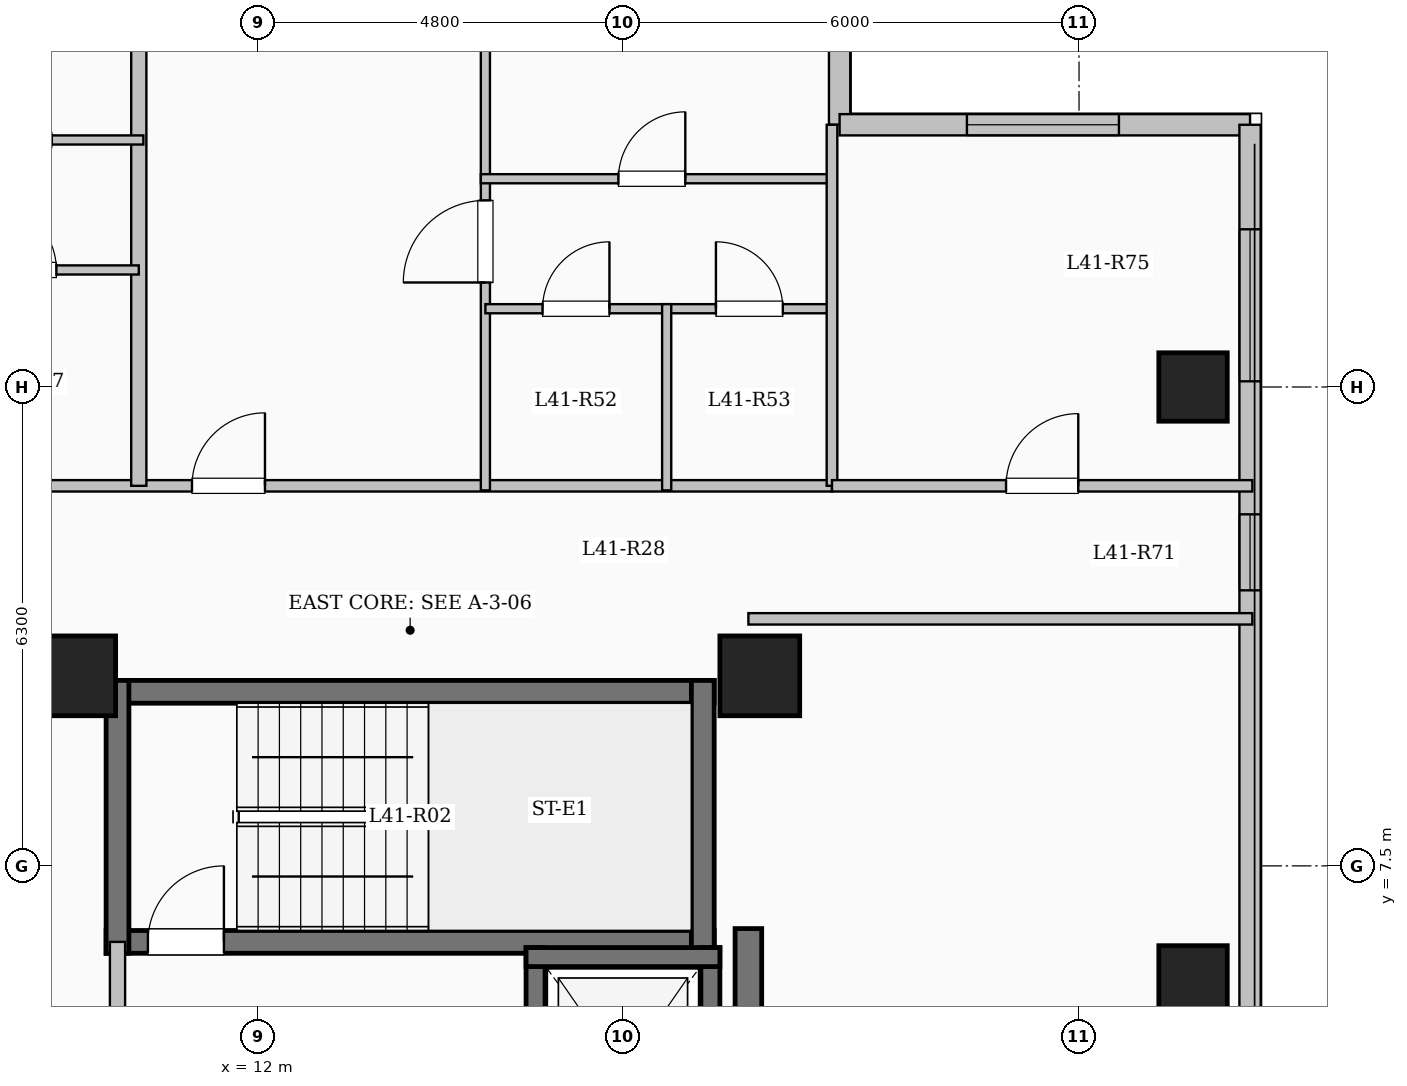
"""IFC4 building model, lengths in metres.
Left out: names, types, materials, properties, quantities, classifications, styles, units other than length and angle.
Written with IfcOpenShell. Run it as: python <this file> out.ifc"""

import sys

from ifc_helpers import new_model, si_unit, direction, frame, frame_2d, origin, origin_2d, place, context, subcontext, project, spatial, rectangle, extrude, element, fill, save


model = new_model("IFC4")
c1 = context("Model", 3, precision=1e-05, world=origin(), true_north=direction((0.0, 1.0)))
c2 = subcontext(c1, "Body", "Model", "MODEL_VIEW")
j1 = project(units=[si_unit("LENGTHUNIT", "METRE"), si_unit("PLANEANGLEUNIT", "RADIAN")], contexts=[c1])
p1 = place(None, origin())
s1 = spatial("IfcSite", under=j1, at=p1, CompositionType="ELEMENT")
p2 = place(p1, origin())
s2 = spatial("IfcBuilding", under=s1, at=p2, CompositionType="ELEMENT")
p3 = place(p2, frame((0.0, 0.0, 152.7)))
s3 = spatial("IfcBuildingStorey", under=s2, at=p3, CompositionType="ELEMENT", Elevation=152.7)
for number, where, z_axis, x_axis in (
    (1, (9.6, 10.0, 0.0), (0.0, 0.0, 1.0), (1.0, 0.0, 0.0)),
    (2, (18.6, 10.0, 0.0), (0.0, 0.0, 1.0), (1.0, 0.0, 0.0)),
):
    element("IfcColumn", number, at=place(p3, frame(where, z_axis=z_axis, x_axis=x_axis)), inside=s3, PredefinedType="COLUMN", context=c2, shape_type="SweptSolid", body=[
        extrude(rectangle(XDim=1.05, YDim=1.05, at=origin_2d()), origin(), (0.0, 0.0, 1.0), 3.35),
    ])
for number, where, z_axis, x_axis in (
    (3, (24.3, 6.0, 0.0), (0.0, 0.0, 1.0), (1.0, 0.0, 0.0)),
    (4, (24.3, 13.8, 0.0), (0.0, 0.0, 1.0), (1.0, 0.0, 0.0)),
):
    element("IfcColumn", number, at=place(p3, frame(where, z_axis=z_axis, x_axis=x_axis)), inside=s3, PredefinedType="COLUMN", context=c2, shape_type="SweptSolid", body=[
        extrude(rectangle(XDim=0.9, YDim=0.9, at=origin_2d()), origin(), (0.0, 0.0, 1.0), 3.35),
    ])
p4 = place(p3, frame((19.65, 21.15, 0.0), z_axis=(0.0, 0.0, 1.0), x_axis=(0.0, -1.0, 0.0)))
e5 = element("IfcWall", 5, at=p4, inside=s3, PredefinedType="SOLIDWALL", context=c2, shape_type="SweptSolid", body=[
    extrude(rectangle(XDim=3.9, YDim=0.28, at=frame_2d((1.95, 0.0))), origin(), (0.0, 0.0, 1.0), 3.1),
])
p5 = place(p4, frame((1.143, 0.0, 0.9)))
e6 = element("IfcOpeningElement", 6, at=p5, cuts=e5, PredefinedType="OPENING", context=c2, shape_type="SweptSolid", body=[
    extrude(rectangle(XDim=1.65, YDim=1.6, at=frame_2d((0.825, 0.8))), frame((0.0, 0.15, 0.0), z_axis=(0.0, -1.0, 0.0), x_axis=(1.0, 0.0, 0.0)), (0.0, 0.0, 1.0), 0.3),
])
p6 = place(p3, frame((19.65, 17.25, 0.0), z_axis=(0.0, 0.0, 1.0), x_axis=(1.0, 0.0, 0.0)))
e7 = element("IfcWall", 7, at=p6, inside=s3, PredefinedType="SOLIDWALL", context=c2, shape_type="SweptSolid", body=[
    extrude(rectangle(XDim=5.4, YDim=0.28, at=frame_2d((2.7, 0.0))), origin(), (0.0, 0.0, 1.0), 3.1),
])
p7 = place(p6, frame((1.675, 0.0, 0.9)))
e8 = element("IfcOpeningElement", 8, at=p7, cuts=e7, PredefinedType="OPENING", context=c2, shape_type="SweptSolid", body=[
    extrude(rectangle(XDim=2.0, YDim=1.7, at=frame_2d((1.0, 0.85))), frame((0.0, 0.15, 0.0), z_axis=(0.0, -1.0, 0.0), x_axis=(1.0, 0.0, 0.0)), (0.0, 0.0, 1.0), 0.3),
])
p8 = place(p3, frame((25.05, 17.25, 0.0), z_axis=(0.0, 0.0, 1.0), x_axis=(0.0, -1.0, 0.0)))
e9 = element("IfcWall", 9, at=p8, inside=s3, PredefinedType="SOLIDWALL", context=c2, shape_type="SweptSolid", body=[
    extrude(rectangle(XDim=34.5, YDim=0.28, at=frame_2d((17.25, 0.0))), origin(), (0.0, 0.0, 1.0), 3.1),
])
p9 = place(p8, frame((1.375, 0.0, 0.9)))
e10 = element("IfcOpeningElement", 10, at=p9, cuts=e9, PredefinedType="OPENING", context=c2, shape_type="SweptSolid", body=[
    extrude(rectangle(XDim=2.0, YDim=1.7, at=frame_2d((1.0, 0.85))), frame((0.0, 0.15, 0.0), z_axis=(0.0, -1.0, 0.0), x_axis=(1.0, 0.0, 0.0)), (0.0, 0.0, 1.0), 0.3),
])
p10 = place(p8, frame((5.125, 0.0, 0.95)))
e11 = element("IfcOpeningElement", 11, at=p10, cuts=e9, PredefinedType="OPENING", context=c2, shape_type="SweptSolid", body=[
    extrude(rectangle(XDim=1.0, YDim=1.5, at=frame_2d((0.5, 0.75))), frame((0.0, 0.15, 0.0), z_axis=(0.0, -1.0, 0.0), x_axis=(1.0, 0.0, 0.0)), (0.0, 0.0, 1.0), 0.3),
])
p11 = place(p8, frame((14.5, 0.0, 0.9)))
e12 = element("IfcOpeningElement", 12, at=p11, cuts=e9, PredefinedType="OPENING", context=c2, shape_type="SweptSolid", body=[
    extrude(rectangle(XDim=2.0, YDim=1.7, at=frame_2d((1.0, 0.85))), frame((0.0, 0.15, 0.0), z_axis=(0.0, -1.0, 0.0), x_axis=(1.0, 0.0, 0.0)), (0.0, 0.0, 1.0), 0.3),
])
p12 = place(p8, frame((25.258, 0.0, 0.9)))
e13 = element("IfcOpeningElement", 13, at=p12, cuts=e9, PredefinedType="OPENING", context=c2, shape_type="SweptSolid", body=[
    extrude(rectangle(XDim=1.5, YDim=1.65, at=frame_2d((0.75, 0.825))), frame((0.0, 0.15, 0.0), z_axis=(0.0, -1.0, 0.0), x_axis=(1.0, 0.0, 0.0)), (0.0, 0.0, 1.0), 0.3),
])
p13 = place(p8, frame((29.95, 0.0, 0.9)))
e14 = element("IfcOpeningElement", 14, at=p13, cuts=e9, PredefinedType="OPENING", context=c2, shape_type="SweptSolid", body=[
    extrude(rectangle(XDim=2.2, YDim=1.75, at=frame_2d((1.1, 0.875))), frame((0.0, 0.15, 0.0), z_axis=(0.0, -1.0, 0.0), x_axis=(1.0, 0.0, 0.0)), (0.0, 0.0, 1.0), 0.3),
])
p14 = place(p3, frame((10.0, 9.79, 0.0), z_axis=(0.0, 0.0, 1.0), x_axis=(1.0, 0.0, 0.0)))
e15 = element("IfcWall", 15, at=p14, inside=s3, PredefinedType="SHEAR", context=c2, shape_type="SweptSolid", body=[
    extrude(rectangle(XDim=8.0, YDim=0.3, at=frame_2d((4.0, 0.0))), origin(), (0.0, 0.0, 1.0), 3.35),
])
p15 = place(p3, frame((10.0, 6.5, 0.0), z_axis=(0.0, 0.0, 1.0), x_axis=(1.0, 0.0, 0.0)))
e16 = element("IfcWall", 16, at=p15, inside=s3, PredefinedType="SHEAR", context=c2, shape_type="SweptSolid", body=[
    extrude(rectangle(XDim=8.0, YDim=0.3, at=frame_2d((4.0, 0.0))), origin(), (0.0, 0.0, 1.0), 3.35),
])
p16 = place(p15, frame((0.55, 0.0, 0.0)))
e17 = element("IfcOpeningElement", 17, at=p16, cuts=e16, PredefinedType="OPENING", context=c2, shape_type="SweptSolid", body=[
    extrude(rectangle(XDim=1.0, YDim=2.15, at=frame_2d((0.5, 1.075))), frame((0.0, 0.16, 0.0), z_axis=(0.0, -1.0, 0.0), x_axis=(1.0, 0.0, 0.0)), (0.0, 0.0, 1.0), 0.32),
])
for number, where, z_axis, x_axis in (
    (18, (10.15, 6.35, 0.0), (0.0, 0.0, 1.0), (0.0, 1.0, 0.0)),
    (19, (17.85, 6.35, 0.0), (0.0, 0.0, 1.0), (0.0, 1.0, 0.0)),
):
    element("IfcWall", number, at=place(p3, frame(where, z_axis=z_axis, x_axis=x_axis)), inside=s3, PredefinedType="SHEAR", context=c2, shape_type="SweptSolid", body=[
        extrude(rectangle(XDim=3.59, YDim=0.3, at=frame_2d((1.795, 0.0))), origin(), (0.0, 0.0, 1.0), 3.35),
    ])
p17 = place(p3, frame((10.15, 3.25, 0.0), z_axis=(0.0, 0.0, 1.0), x_axis=(0.0, 1.0, 0.0)))
e20 = element("IfcWall", 20, at=p17, inside=s3, PredefinedType="SOLIDWALL", context=c2, shape_type="SweptSolid", body=[
    extrude(rectangle(XDim=3.25, YDim=0.2, at=frame_2d((1.625, 0.0))), origin(), (0.0, 0.0, 1.0), 3.1),
])
p18 = place(p17, frame((1.1, 0.0, 0.0)))
e21 = element("IfcOpeningElement", 21, at=p18, cuts=e20, PredefinedType="OPENING", context=c2, shape_type="SweptSolid", body=[
    extrude(rectangle(XDim=1.02, YDim=2.15, at=frame_2d((0.51, 1.075))), frame((0.0, 0.11, 0.0), z_axis=(0.0, -1.0, 0.0), x_axis=(1.0, 0.0, 0.0)), (0.0, 0.0, 1.0), 0.22),
])
p19 = place(p3, frame((15.65, 3.175, 0.0), z_axis=(0.0, 0.0, 1.0), x_axis=(0.0, 1.0, 0.0)))
e22 = element("IfcWall", 22, at=p19, inside=s3, PredefinedType="SHEAR", context=c2, shape_type="SweptSolid", body=[
    extrude(rectangle(XDim=3.25, YDim=0.25, at=frame_2d((1.625, 0.0))), origin(), (0.0, 0.0, 1.0), 3.35),
])
p20 = place(p19, frame((1.075, 0.0, 0.0)))
e23 = element("IfcOpeningElement", 23, at=p20, cuts=e22, PredefinedType="OPENING", context=c2, shape_type="SweptSolid", body=[
    extrude(rectangle(XDim=1.1, YDim=2.15, at=frame_2d((0.55, 1.075))), frame((0.0, 0.135, 0.0), z_axis=(0.0, -1.0, 0.0), x_axis=(1.0, 0.0, 0.0)), (0.0, 0.0, 1.0), 0.27),
])
p21 = place(p3, frame((17.95, 3.175, 0.0), z_axis=(0.0, 0.0, 1.0), x_axis=(0.0, 1.0, 0.0)))
e24 = element("IfcWall", 24, at=p21, inside=s3, PredefinedType="SHEAR", context=c2, shape_type="SweptSolid", body=[
    extrude(rectangle(XDim=3.25, YDim=0.25, at=frame_2d((1.625, 0.0))), origin(), (0.0, 0.0, 1.0), 3.35),
])
p22 = place(p3, frame((15.525, 6.3, 0.0), z_axis=(0.0, 0.0, 1.0), x_axis=(1.0, 0.0, 0.0)))
e25 = element("IfcWall", 25, at=p22, inside=s3, PredefinedType="SHEAR", context=c2, shape_type="SweptSolid", body=[
    extrude(rectangle(XDim=2.55, YDim=0.25, at=frame_2d((1.275, 0.0))), origin(), (0.0, 0.0, 1.0), 3.35),
])
p23 = place(p3, frame((18.45, -7.375, 0.0), z_axis=(0.0, 0.0, 1.0), x_axis=(0.0, 1.0, 0.0)))
e26 = element("IfcWall", 26, at=p23, inside=s3, PredefinedType="SHEAR", context=c2, shape_type="SweptSolid", body=[
    extrude(rectangle(XDim=14.05, YDim=0.35, at=frame_2d((7.025, 0.0))), origin(), (0.0, 0.0, 1.0), 3.35),
])
p24 = place(p3, frame((3.85, 12.5, 0.0), z_axis=(0.0, 0.0, 1.0), x_axis=(1.0, 0.0, 0.0)))
e27 = element("IfcWall", 27, at=p24, inside=s3, PredefinedType="PARTITIONING", context=c2, shape_type="SweptSolid", body=[
    extrude(rectangle(XDim=15.7, YDim=0.15, at=frame_2d((7.85, 0.0))), origin(), (0.0, 0.0, 1.0), 3.1),
])
p25 = place(p24, frame((1.0, 0.0, 0.0)))
e28 = element("IfcOpeningElement", 28, at=p25, cuts=e27, PredefinedType="OPENING", context=c2, shape_type="SweptSolid", body=[
    extrude(rectangle(XDim=0.96, YDim=2.15, at=frame_2d((0.48, 1.075))), frame((0.0, 0.085, 0.0), z_axis=(0.0, -1.0, 0.0), x_axis=(1.0, 0.0, 0.0)), (0.0, 0.0, 1.0), 0.17),
])
p26 = place(p24, frame((7.28, 0.0, 0.0)))
e29 = element("IfcOpeningElement", 29, at=p26, cuts=e27, PredefinedType="OPENING", context=c2, shape_type="SweptSolid", body=[
    extrude(rectangle(XDim=0.96, YDim=2.15, at=frame_2d((0.48, 1.075))), frame((0.0, 0.085, 0.0), z_axis=(0.0, -1.0, 0.0), x_axis=(1.0, 0.0, 0.0)), (0.0, 0.0, 1.0), 0.17),
])
p27 = place(p3, frame((10.43, 12.5, 0.0), z_axis=(0.0, 0.0, 1.0), x_axis=(0.0, 1.0, 0.0)))
e30 = element("IfcWall", 30, at=p27, inside=s3, PredefinedType="SOLIDWALL", context=c2, shape_type="SweptSolid", body=[
    extrude(rectangle(XDim=8.841, YDim=0.2, at=frame_2d((4.42, 0.0))), origin(), (0.0, 0.0, 1.0), 3.1),
])
p28 = place(p3, frame((7.383, 15.34, 0.0), z_axis=(0.0, 0.0, 1.0), x_axis=(1.0, 0.0, 0.0)))
e31 = element("IfcWall", 31, at=p28, inside=s3, PredefinedType="PARTITIONING", context=c2, shape_type="SweptSolid", body=[
    extrude(rectangle(XDim=3.047, YDim=0.12, at=frame_2d((1.523, 0.0))), origin(), (0.0, 0.0, 1.0), 3.1),
])
p29 = place(p28, frame((1.083, 0.0, 0.0)))
e32 = element("IfcOpeningElement", 32, at=p29, cuts=e31, PredefinedType="OPENING", context=c2, shape_type="SweptSolid", body=[
    extrude(rectangle(XDim=0.88, YDim=2.1, at=frame_2d((0.44, 1.05))), frame((0.0, 0.07, 0.0), z_axis=(0.0, -1.0, 0.0), x_axis=(1.0, 0.0, 0.0)), (0.0, 0.0, 1.0), 0.14),
])
p30 = place(p3, frame((4.454, 17.05, 0.0), z_axis=(0.0, 0.0, 1.0), x_axis=(1.0, 0.0, 0.0)))
e33 = element("IfcWall", 33, at=p30, inside=s3, PredefinedType="PARTITIONING", context=c2, shape_type="SweptSolid", body=[
    extrude(rectangle(XDim=6.036, YDim=0.12, at=frame_2d((3.018, 0.0))), origin(), (0.0, 0.0, 1.0), 2.685),
])
p31 = place(p30, frame((1.024, 0.0, 0.0)))
e34 = element("IfcOpeningElement", 34, at=p31, cuts=e33, PredefinedType="OPENING", context=c2, shape_type="SweptSolid", body=[
    extrude(rectangle(XDim=0.88, YDim=2.1, at=frame_2d((0.44, 1.05))), frame((0.0, 0.07, 0.0), z_axis=(0.0, -1.0, 0.0), x_axis=(1.0, 0.0, 0.0)), (0.0, 0.0, 1.0), 0.14),
])
p32 = place(p30, frame((3.952, 0.0, 0.0)))
e35 = element("IfcOpeningElement", 35, at=p32, cuts=e33, PredefinedType="OPENING", context=c2, shape_type="SweptSolid", body=[
    extrude(rectangle(XDim=0.88, YDim=2.1, at=frame_2d((0.44, 1.05))), frame((0.0, 0.07, 0.0), z_axis=(0.0, -1.0, 0.0), x_axis=(1.0, 0.0, 0.0)), (0.0, 0.0, 1.0), 0.14),
])
p33 = place(p3, frame((14.99, 12.44, 0.0), z_axis=(0.0, 0.0, 1.0), x_axis=(0.0, 1.0, 0.0)))
e36 = element("IfcWall", 36, at=p33, inside=s3, PredefinedType="PARTITIONING", context=c2, shape_type="SweptSolid", body=[
    extrude(rectangle(XDim=8.76, YDim=0.12, at=frame_2d((4.38, 0.0))), origin(), (0.0, 0.0, 1.0), 2.585),
])
p34 = place(p33, frame((2.735, 0.0, 0.0)))
e37 = element("IfcOpeningElement", 37, at=p34, cuts=e36, PredefinedType="OPENING", context=c2, shape_type="SweptSolid", body=[
    extrude(rectangle(XDim=1.08, YDim=2.15, at=frame_2d((0.54, 1.075))), frame((0.0, 0.07, 0.0), z_axis=(0.0, -1.0, 0.0), x_axis=(1.0, 0.0, 0.0)), (0.0, 0.0, 1.0), 0.14),
])
p35 = place(p3, frame((14.99, 14.83, 0.0), z_axis=(0.0, 0.0, 1.0), x_axis=(1.0, 0.0, 0.0)))
e38 = element("IfcWall", 38, at=p35, inside=s3, PredefinedType="PARTITIONING", context=c2, shape_type="SweptSolid", body=[
    extrude(rectangle(XDim=2.385, YDim=0.12, at=frame_2d((1.192, 0.0))), origin(), (0.0, 0.0, 1.0), 3.1),
])
p36 = place(p35, frame((0.752, 0.0, 0.0)))
e39 = element("IfcOpeningElement", 39, at=p36, cuts=e38, PredefinedType="OPENING", context=c2, shape_type="SweptSolid", body=[
    extrude(rectangle(XDim=0.88, YDim=2.1, at=frame_2d((0.44, 1.05))), frame((0.0, 0.07, 0.0), z_axis=(0.0, -1.0, 0.0), x_axis=(1.0, 0.0, 0.0)), (0.0, 0.0, 1.0), 0.14),
])
p37 = place(p3, frame((17.375, 14.83, 0.0), z_axis=(0.0, 0.0, 1.0), x_axis=(1.0, 0.0, 0.0)))
e40 = element("IfcWall", 40, at=p37, inside=s3, PredefinedType="PARTITIONING", context=c2, shape_type="SweptSolid", body=[
    extrude(rectangle(XDim=2.175, YDim=0.12, at=frame_2d((1.087, 0.0))), origin(), (0.0, 0.0, 1.0), 3.1),
])
p38 = place(p37, frame((0.648, 0.0, 0.0)))
e41 = element("IfcOpeningElement", 41, at=p38, cuts=e40, PredefinedType="OPENING", context=c2, shape_type="SweptSolid", body=[
    extrude(rectangle(XDim=0.88, YDim=2.1, at=frame_2d((0.44, 1.05))), frame((0.0, 0.07, 0.0), z_axis=(0.0, -1.0, 0.0), x_axis=(1.0, 0.0, 0.0)), (0.0, 0.0, 1.0), 0.14),
])
p39 = place(p3, frame((14.93, 16.54, 0.0), z_axis=(0.0, 0.0, 1.0), x_axis=(1.0, 0.0, 0.0)))
e42 = element("IfcWall", 42, at=p39, inside=s3, PredefinedType="PARTITIONING", context=c2, shape_type="SweptSolid", body=[
    extrude(rectangle(XDim=4.68, YDim=0.12, at=frame_2d((2.34, 0.0))), origin(), (0.0, 0.0, 1.0), 3.1),
])
p40 = place(p39, frame((1.81, 0.0, 0.0)))
e43 = element("IfcOpeningElement", 43, at=p40, cuts=e42, PredefinedType="OPENING", context=c2, shape_type="SweptSolid", body=[
    extrude(rectangle(XDim=0.88, YDim=2.1, at=frame_2d((0.44, 1.05))), frame((0.0, 0.07, 0.0), z_axis=(0.0, -1.0, 0.0), x_axis=(1.0, 0.0, 0.0)), (0.0, 0.0, 1.0), 0.14),
])
p41 = place(p3, frame((17.375, 12.44, 0.0), z_axis=(0.0, 0.0, 1.0), x_axis=(0.0, 1.0, 0.0)))
e44 = element("IfcWall", 44, at=p41, inside=s3, PredefinedType="PARTITIONING", context=c2, shape_type="SweptSolid", body=[
    extrude(rectangle(XDim=2.45, YDim=0.12, at=frame_2d((1.225, 0.0))), origin(), (0.0, 0.0, 1.0), 3.1),
])
p42 = place(p3, frame((18.45, 10.75, 0.0), z_axis=(0.0, 0.0, 1.0), x_axis=(1.0, 0.0, 0.0)))
e45 = element("IfcWall", 45, at=p42, inside=s3, PredefinedType="PARTITIONING", context=c2, shape_type="SweptSolid", body=[
    extrude(rectangle(XDim=6.63, YDim=0.15, at=frame_2d((3.315, 0.0))), origin(), (0.0, 0.0, 1.0), 3.1),
])
p43 = place(p3, frame((19.55, 12.5, 0.0), z_axis=(0.0, 0.0, 1.0), x_axis=(0.0, 1.0, 0.0)))
e46 = element("IfcWall", 46, at=p43, inside=s3, PredefinedType="PARTITIONING", context=c2, shape_type="SweptSolid", body=[
    extrude(rectangle(XDim=4.75, YDim=0.14, at=frame_2d((2.375, 0.0))), origin(), (0.0, 0.0, 1.0), 3.1),
])
p44 = place(p3, frame((19.55, 12.5, 0.0), z_axis=(0.0, 0.0, 1.0), x_axis=(1.0, 0.0, 0.0)))
e47 = element("IfcWall", 47, at=p44, inside=s3, PredefinedType="PARTITIONING", context=c2, shape_type="SweptSolid", body=[
    extrude(rectangle(XDim=5.53, YDim=0.15, at=frame_2d((2.765, 0.0))), origin(), (0.0, 0.0, 1.0), 3.1),
])
p45 = place(p44, frame((2.29, 0.0, 0.0)))
e48 = element("IfcOpeningElement", 48, at=p45, cuts=e47, PredefinedType="OPENING", context=c2, shape_type="SweptSolid", body=[
    extrude(rectangle(XDim=0.95, YDim=2.15, at=frame_2d((0.475, 1.075))), frame((0.0, 0.085, 0.0), z_axis=(0.0, -1.0, 0.0), x_axis=(1.0, 0.0, 0.0)), (0.0, 0.0, 1.0), 0.17),
])
p46 = place(p7, origin())
e49 = element("IfcWindow", 49, at=p46, inside=s3, PartitioningType="SINGLE_PANEL", PredefinedType="WINDOW", context=c2, shape_type="SweptSolid", body=[
    extrude(rectangle(XDim=2.0, YDim=1.7, at=frame_2d((1.0, 0.85))), frame((0.0, 0.03, 0.0), z_axis=(0.0, -1.0, 0.0), x_axis=(1.0, 0.0, 0.0)), (0.0, 0.0, 1.0), 0.06),
])
fill(e8, e49)
p47 = place(p9, origin())
e50 = element("IfcWindow", 50, at=p47, inside=s3, PartitioningType="SINGLE_PANEL", PredefinedType="WINDOW", context=c2, shape_type="SweptSolid", body=[
    extrude(rectangle(XDim=2.0, YDim=1.7, at=frame_2d((1.0, 0.85))), frame((0.0, 0.03, 0.0), z_axis=(0.0, -1.0, 0.0), x_axis=(1.0, 0.0, 0.0)), (0.0, 0.0, 1.0), 0.06),
])
fill(e10, e50)
p48 = place(p10, origin())
e51 = element("IfcWindow", 51, at=p48, inside=s3, PartitioningType="SINGLE_PANEL", PredefinedType="WINDOW", context=c2, shape_type="SweptSolid", body=[
    extrude(rectangle(XDim=1.0, YDim=1.5, at=frame_2d((0.5, 0.75))), frame((0.0, 0.03, 0.0), z_axis=(0.0, -1.0, 0.0), x_axis=(1.0, 0.0, 0.0)), (0.0, 0.0, 1.0), 0.06),
])
fill(e11, e51)
p49 = place(p16, origin())
e52 = element("IfcDoor", 52, at=p49, inside=s3, OperationType="SINGLE_SWING_RIGHT", PredefinedType="DOOR", context=c2, shape_type="SweptSolid", body=[
    extrude(rectangle(XDim=1.0, YDim=2.15, at=frame_2d((0.5, 1.075))), frame((0.0, 0.025, 0.0), z_axis=(0.0, -1.0, 0.0), x_axis=(1.0, 0.0, 0.0)), (0.0, 0.0, 1.0), 0.05),
])
fill(e17, e52)
p50 = place(p29, origin())
e53 = element("IfcDoor", 53, at=p50, inside=s3, OperationType="SINGLE_SWING_LEFT", PredefinedType="DOOR", context=c2, shape_type="SweptSolid", body=[
    extrude(rectangle(XDim=0.88, YDim=2.1, at=frame_2d((0.44, 1.05))), frame((0.0, 0.025, 0.0), z_axis=(0.0, -1.0, 0.0), x_axis=(1.0, 0.0, 0.0)), (0.0, 0.0, 1.0), 0.05),
])
fill(e32, e53)
p51 = place(p26, origin())
e54 = element("IfcDoor", 54, at=p51, inside=s3, OperationType="SINGLE_SWING_RIGHT", PredefinedType="DOOR", context=c2, shape_type="SweptSolid", body=[
    extrude(rectangle(XDim=0.96, YDim=2.15, at=frame_2d((0.48, 1.075))), frame((0.0, 0.025, 0.0), z_axis=(0.0, -1.0, 0.0), x_axis=(1.0, 0.0, 0.0)), (0.0, 0.0, 1.0), 0.05),
])
fill(e29, e54)
p52 = place(p34, origin())
e55 = element("IfcDoor", 55, at=p52, inside=s3, OperationType="SINGLE_SWING_LEFT", PredefinedType="DOOR", context=c2, shape_type="SweptSolid", body=[
    extrude(rectangle(XDim=1.08, YDim=2.15, at=frame_2d((0.54, 1.075))), frame((0.0, 0.025, 0.0), z_axis=(0.0, -1.0, 0.0), x_axis=(1.0, 0.0, 0.0)), (0.0, 0.0, 1.0), 0.05),
])
fill(e37, e55)
p53 = place(p36, origin())
e56 = element("IfcDoor", 56, at=p53, inside=s3, OperationType="SINGLE_SWING_RIGHT", PredefinedType="DOOR", context=c2, shape_type="SweptSolid", body=[
    extrude(rectangle(XDim=0.88, YDim=2.1, at=frame_2d((0.44, 1.05))), frame((0.0, 0.025, 0.0), z_axis=(0.0, -1.0, 0.0), x_axis=(1.0, 0.0, 0.0)), (0.0, 0.0, 1.0), 0.05),
])
fill(e39, e56)
p54 = place(p38, origin())
e57 = element("IfcDoor", 57, at=p54, inside=s3, OperationType="SINGLE_SWING_LEFT", PredefinedType="DOOR", context=c2, shape_type="SweptSolid", body=[
    extrude(rectangle(XDim=0.88, YDim=2.1, at=frame_2d((0.44, 1.05))), frame((0.0, 0.025, 0.0), z_axis=(0.0, -1.0, 0.0), x_axis=(1.0, 0.0, 0.0)), (0.0, 0.0, 1.0), 0.05),
])
fill(e41, e57)
p55 = place(p40, origin())
e58 = element("IfcDoor", 58, at=p55, inside=s3, OperationType="SINGLE_SWING_RIGHT", PredefinedType="DOOR", context=c2, shape_type="SweptSolid", body=[
    extrude(rectangle(XDim=0.88, YDim=2.1, at=frame_2d((0.44, 1.05))), frame((0.0, 0.025, 0.0), z_axis=(0.0, -1.0, 0.0), x_axis=(1.0, 0.0, 0.0)), (0.0, 0.0, 1.0), 0.05),
])
fill(e43, e58)
p56 = place(p45, origin())
e59 = element("IfcDoor", 59, at=p56, inside=s3, OperationType="SINGLE_SWING_RIGHT", PredefinedType="DOOR", context=c2, shape_type="SweptSolid", body=[
    extrude(rectangle(XDim=0.95, YDim=2.15, at=frame_2d((0.475, 1.075))), frame((0.0, 0.025, 0.0), z_axis=(0.0, -1.0, 0.0), x_axis=(1.0, 0.0, 0.0)), (0.0, 0.0, 1.0), 0.05),
])
fill(e48, e59)
save(model, sys.argv[1])
